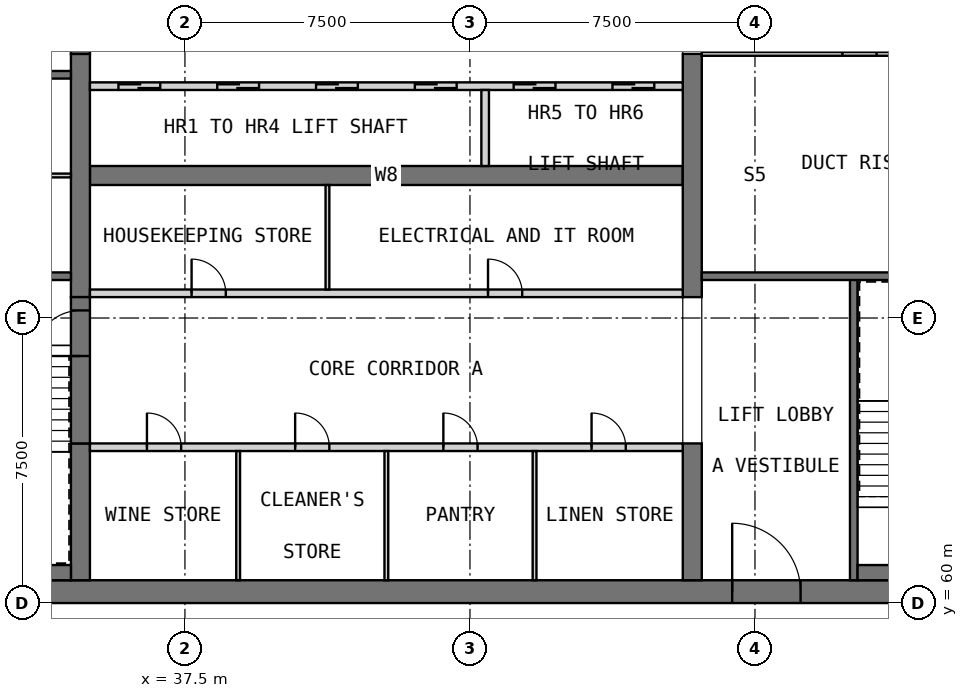
"""IFC4 building model, lengths in metres.
Left out: names, types, materials, properties, quantities, classifications, styles, units other than length and angle.
Written with IfcOpenShell. Run it as: python <this file> out.ifc"""

import sys

from ifc_helpers import new_model, si_unit, direction, frame, frame_2d, origin, place, context, subcontext, project, spatial, rectangle, extrude, element, fill, save


model = new_model("IFC4")
c1 = context("Model", 3, precision=1e-05, world=origin(), true_north=direction((0.0, 1.0)))
c2 = subcontext(c1, "Body", "Model", "MODEL_VIEW")
j1 = project(units=[si_unit("LENGTHUNIT", "METRE"), si_unit("PLANEANGLEUNIT", "RADIAN")], contexts=[c1])
p1 = place(None, origin())
s1 = spatial("IfcSite", under=j1, at=p1, CompositionType="ELEMENT")
p2 = place(p1, origin())
s2 = spatial("IfcBuilding", under=s1, at=p2, CompositionType="ELEMENT")
p3 = place(p2, frame((0.0, 0.0, 276.7)))
s3 = spatial("IfcBuildingStorey", under=s2, at=p3, CompositionType="ELEMENT", Elevation=276.7)
p4 = place(p3, frame((30.0, 60.3, 0.0), z_axis=(0.0, 0.0, 1.0), x_axis=(1.0, 0.0, 0.0)))
e1 = element("IfcWall", 1, at=p4, inside=s3, PredefinedType="SHEAR", context=c2, shape_type="SweptSolid", body=[
    extrude(rectangle(XDim=30.0, YDim=0.6, at=frame_2d((15.0, 0.0))), origin(), (0.0, 0.0, 1.0), 3.5),
])
p5 = place(p4, frame((21.9, 0.0, 0.0)))
e2 = element("IfcOpeningElement", 2, at=p5, cuts=e1, PredefinedType="OPENING", context=c2, shape_type="SweptSolid", body=[
    extrude(rectangle(XDim=1.8, YDim=2.1, at=frame_2d((0.9, 1.05))), frame((0.0, 0.31, 0.0), z_axis=(0.0, -1.0, 0.0), x_axis=(1.0, 0.0, 0.0)), (0.0, 0.0, 1.0), 0.62),
])
p6 = place(p4, frame((26.5, 0.0, 0.0)))
e3 = element("IfcOpeningElement", 3, at=p6, cuts=e1, PredefinedType="OPENING", context=c2, shape_type="SweptSolid", body=[
    extrude(rectangle(XDim=1.2, YDim=2.1, at=frame_2d((0.6, 1.05))), frame((0.0, 0.31, 0.0), z_axis=(0.0, -1.0, 0.0), x_axis=(1.0, 0.0, 0.0)), (0.0, 0.0, 1.0), 0.62),
])
p7 = place(p3, frame((35.0, 71.25, 0.0), z_axis=(0.0, 0.0, 1.0), x_axis=(1.0, 0.0, 0.0)))
e4 = element("IfcWall", 4, at=p7, inside=s3, PredefinedType="SHEAR", context=c2, shape_type="SweptSolid", body=[
    extrude(rectangle(XDim=15.6, YDim=0.5, at=frame_2d((7.8, 0.0))), origin(), (0.0, 0.0, 1.0), 3.5),
])
p8 = place(p3, frame((34.75, 60.6, 0.0), z_axis=(0.0, 0.0, 1.0), x_axis=(0.0, 1.0, 0.0)))
e5 = element("IfcWall", 5, at=p8, inside=s3, PredefinedType="SHEAR", context=c2, shape_type="SweptSolid", body=[
    extrude(rectangle(XDim=3.6, YDim=0.5, at=frame_2d((1.8, 0.0))), origin(), (0.0, 0.0, 1.0), 3.5),
])
p9 = place(p3, frame((34.75, 68.05, 0.0), z_axis=(0.0, 0.0, 1.0), x_axis=(0.0, 1.0, 0.0)))
e6 = element("IfcWall", 6, at=p9, inside=s3, PredefinedType="SHEAR", context=c2, shape_type="SweptSolid", body=[
    extrude(rectangle(XDim=6.4, YDim=0.5, at=frame_2d((3.2, 0.0))), origin(), (0.0, 0.0, 1.0), 3.5),
])
p10 = place(p3, frame((50.85, 60.6, 0.0), z_axis=(0.0, 0.0, 1.0), x_axis=(0.0, 1.0, 0.0)))
e7 = element("IfcWall", 7, at=p10, inside=s3, PredefinedType="SHEAR", context=c2, shape_type="SweptSolid", body=[
    extrude(rectangle(XDim=3.6, YDim=0.5, at=frame_2d((1.8, 0.0))), origin(), (0.0, 0.0, 1.0), 3.5),
])
p11 = place(p3, frame((50.85, 68.05, 0.0), z_axis=(0.0, 0.0, 1.0), x_axis=(0.0, 1.0, 0.0)))
e8 = element("IfcWall", 8, at=p11, inside=s3, PredefinedType="SHEAR", context=c2, shape_type="SweptSolid", body=[
    extrude(rectangle(XDim=6.4, YDim=0.5, at=frame_2d((3.2, 0.0))), origin(), (0.0, 0.0, 1.0), 3.5),
])
p12 = place(p3, frame((35.0, 64.1, 0.0), z_axis=(0.0, 0.0, 1.0), x_axis=(1.0, 0.0, 0.0)))
e9 = element("IfcWall", 9, at=p12, inside=s3, PredefinedType="PARTITIONING", context=c2, shape_type="SweptSolid", body=[
    extrude(rectangle(XDim=15.6, YDim=0.2, at=frame_2d((7.8, 0.0))), origin(), (0.0, 0.0, 1.0), 3.25),
])
p13 = place(p12, frame((1.5, 0.0, 0.0)))
e10 = element("IfcOpeningElement", 10, at=p13, cuts=e9, PredefinedType="OPENING", context=c2, shape_type="SweptSolid", body=[
    extrude(rectangle(XDim=0.9, YDim=2.1, at=frame_2d((0.45, 1.05))), frame((0.0, 0.11, 0.0), z_axis=(0.0, -1.0, 0.0), x_axis=(1.0, 0.0, 0.0)), (0.0, 0.0, 1.0), 0.22),
])
p14 = place(p12, frame((5.4, 0.0, 0.0)))
e11 = element("IfcOpeningElement", 11, at=p14, cuts=e9, PredefinedType="OPENING", context=c2, shape_type="SweptSolid", body=[
    extrude(rectangle(XDim=0.9, YDim=2.1, at=frame_2d((0.45, 1.05))), frame((0.0, 0.11, 0.0), z_axis=(0.0, -1.0, 0.0), x_axis=(1.0, 0.0, 0.0)), (0.0, 0.0, 1.0), 0.22),
])
p15 = place(p12, frame((9.3, 0.0, 0.0)))
e12 = element("IfcOpeningElement", 12, at=p15, cuts=e9, PredefinedType="OPENING", context=c2, shape_type="SweptSolid", body=[
    extrude(rectangle(XDim=0.9, YDim=2.1, at=frame_2d((0.45, 1.05))), frame((0.0, 0.11, 0.0), z_axis=(0.0, -1.0, 0.0), x_axis=(1.0, 0.0, 0.0)), (0.0, 0.0, 1.0), 0.22),
])
p16 = place(p12, frame((13.2, 0.0, 0.0)))
e13 = element("IfcOpeningElement", 13, at=p16, cuts=e9, PredefinedType="OPENING", context=c2, shape_type="SweptSolid", body=[
    extrude(rectangle(XDim=0.9, YDim=2.1, at=frame_2d((0.45, 1.05))), frame((0.0, 0.11, 0.0), z_axis=(0.0, -1.0, 0.0), x_axis=(1.0, 0.0, 0.0)), (0.0, 0.0, 1.0), 0.22),
])
for number, where, z_axis, x_axis in (
    (14, (38.9, 60.6, 0.0), (0.0, 0.0, 1.0), (0.0, 1.0, 0.0)),
    (15, (42.8, 60.6, 0.0), (0.0, 0.0, 1.0), (0.0, 1.0, 0.0)),
    (16, (46.7, 60.6, 0.0), (0.0, 0.0, 1.0), (0.0, 1.0, 0.0)),
):
    element("IfcWall", number, at=place(p3, frame(where, z_axis=z_axis, x_axis=x_axis)), inside=s3, PredefinedType="PARTITIONING", context=c2, shape_type="SweptSolid", body=[
        extrude(rectangle(XDim=3.4, YDim=0.1, at=frame_2d((1.7, 0.0))), origin(), (0.0, 0.0, 1.0), 3.25),
    ])
p17 = place(p3, frame((35.0, 68.15, 0.0), z_axis=(0.0, 0.0, 1.0), x_axis=(1.0, 0.0, 0.0)))
e17 = element("IfcWall", 17, at=p17, inside=s3, PredefinedType="PARTITIONING", context=c2, shape_type="SweptSolid", body=[
    extrude(rectangle(XDim=15.6, YDim=0.2, at=frame_2d((7.8, 0.0))), origin(), (0.0, 0.0, 1.0), 3.25),
])
p18 = place(p17, frame((2.675, 0.0, 0.0)))
e18 = element("IfcOpeningElement", 18, at=p18, cuts=e17, PredefinedType="OPENING", context=c2, shape_type="SweptSolid", body=[
    extrude(rectangle(XDim=0.9, YDim=2.1, at=frame_2d((0.45, 1.05))), frame((0.0, 0.11, 0.0), z_axis=(0.0, -1.0, 0.0), x_axis=(1.0, 0.0, 0.0)), (0.0, 0.0, 1.0), 0.22),
])
p19 = place(p17, frame((10.475, 0.0, 0.0)))
e19 = element("IfcOpeningElement", 19, at=p19, cuts=e17, PredefinedType="OPENING", context=c2, shape_type="SweptSolid", body=[
    extrude(rectangle(XDim=0.9, YDim=2.1, at=frame_2d((0.45, 1.05))), frame((0.0, 0.11, 0.0), z_axis=(0.0, -1.0, 0.0), x_axis=(1.0, 0.0, 0.0)), (0.0, 0.0, 1.0), 0.22),
])
p20 = place(p3, frame((41.25, 68.25, 0.0), z_axis=(0.0, 0.0, 1.0), x_axis=(0.0, 1.0, 0.0)))
e20 = element("IfcWall", 20, at=p20, inside=s3, PredefinedType="PARTITIONING", context=c2, shape_type="SweptSolid", body=[
    extrude(rectangle(XDim=2.75, YDim=0.1, at=frame_2d((1.375, 0.0))), origin(), (0.0, 0.0, 1.0), 3.25),
])
p21 = place(p3, frame((35.0, 73.6, 0.0), z_axis=(0.0, 0.0, 1.0), x_axis=(1.0, 0.0, 0.0)))
e21 = element("IfcWall", 21, at=p21, inside=s3, PredefinedType="SOLIDWALL", context=c2, shape_type="SweptSolid", body=[
    extrude(rectangle(XDim=15.6, YDim=0.2, at=frame_2d((7.8, 0.0))), origin(), (0.0, 0.0, 1.0), 3.5),
])
p22 = place(p21, frame((0.75, 0.0, 0.0)))
e22 = element("IfcOpeningElement", 22, at=p22, cuts=e21, PredefinedType="OPENING", context=c2, shape_type="SweptSolid", body=[
    extrude(rectangle(XDim=1.1, YDim=2.1, at=frame_2d((0.55, 1.05))), frame((0.0, 0.11, 0.0), z_axis=(0.0, -1.0, 0.0), x_axis=(1.0, 0.0, 0.0)), (0.0, 0.0, 1.0), 0.22),
])
p23 = place(p21, frame((3.35, 0.0, 0.0)))
e23 = element("IfcOpeningElement", 23, at=p23, cuts=e21, PredefinedType="OPENING", context=c2, shape_type="SweptSolid", body=[
    extrude(rectangle(XDim=1.1, YDim=2.1, at=frame_2d((0.55, 1.05))), frame((0.0, 0.11, 0.0), z_axis=(0.0, -1.0, 0.0), x_axis=(1.0, 0.0, 0.0)), (0.0, 0.0, 1.0), 0.22),
])
p24 = place(p21, frame((5.95, 0.0, 0.0)))
e24 = element("IfcOpeningElement", 24, at=p24, cuts=e21, PredefinedType="OPENING", context=c2, shape_type="SweptSolid", body=[
    extrude(rectangle(XDim=1.1, YDim=2.1, at=frame_2d((0.55, 1.05))), frame((0.0, 0.11, 0.0), z_axis=(0.0, -1.0, 0.0), x_axis=(1.0, 0.0, 0.0)), (0.0, 0.0, 1.0), 0.22),
])
p25 = place(p21, frame((8.55, 0.0, 0.0)))
e25 = element("IfcOpeningElement", 25, at=p25, cuts=e21, PredefinedType="OPENING", context=c2, shape_type="SweptSolid", body=[
    extrude(rectangle(XDim=1.1, YDim=2.1, at=frame_2d((0.55, 1.05))), frame((0.0, 0.11, 0.0), z_axis=(0.0, -1.0, 0.0), x_axis=(1.0, 0.0, 0.0)), (0.0, 0.0, 1.0), 0.22),
])
p26 = place(p21, frame((11.15, 0.0, 0.0)))
e26 = element("IfcOpeningElement", 26, at=p26, cuts=e21, PredefinedType="OPENING", context=c2, shape_type="SweptSolid", body=[
    extrude(rectangle(XDim=1.1, YDim=2.1, at=frame_2d((0.55, 1.05))), frame((0.0, 0.11, 0.0), z_axis=(0.0, -1.0, 0.0), x_axis=(1.0, 0.0, 0.0)), (0.0, 0.0, 1.0), 0.22),
])
p27 = place(p21, frame((13.75, 0.0, 0.0)))
e27 = element("IfcOpeningElement", 27, at=p27, cuts=e21, PredefinedType="OPENING", context=c2, shape_type="SweptSolid", body=[
    extrude(rectangle(XDim=1.1, YDim=2.1, at=frame_2d((0.55, 1.05))), frame((0.0, 0.11, 0.0), z_axis=(0.0, -1.0, 0.0), x_axis=(1.0, 0.0, 0.0)), (0.0, 0.0, 1.0), 0.22),
])
p28 = place(p3, frame((45.4, 71.5, 0.0), z_axis=(0.0, 0.0, 1.0), x_axis=(0.0, 1.0, 0.0)))
e28 = element("IfcWall", 28, at=p28, inside=s3, PredefinedType="SOLIDWALL", context=c2, shape_type="SweptSolid", body=[
    extrude(rectangle(XDim=2.0, YDim=0.2, at=frame_2d((1.0, 0.0))), origin(), (0.0, 0.0, 1.0), 3.5),
])
p29 = place(p3, frame((34.75, 64.2, 0.0), z_axis=(0.0, 0.0, 1.0), x_axis=(0.0, 1.0, 0.0)))
e29 = element("IfcWall", 29, at=p29, inside=s3, PredefinedType="SOLIDWALL", context=c2, shape_type="SweptSolid", body=[
    extrude(rectangle(XDim=3.85, YDim=0.5, at=frame_2d((1.925, 0.0))), origin(), (0.0, 0.0, 1.0), 2.3),
])
p30 = place(p29, frame((2.3, 0.0, 0.0)))
e30 = element("IfcOpeningElement", 30, at=p30, cuts=e29, PredefinedType="OPENING", context=c2, shape_type="SweptSolid", body=[
    extrude(rectangle(XDim=1.2, YDim=2.1, at=frame_2d((0.6, 1.05))), frame((0.0, 0.26, 0.0), z_axis=(0.0, -1.0, 0.0), x_axis=(1.0, 0.0, 0.0)), (0.0, 0.0, 1.0), 0.52),
])
p31 = place(p3, frame((34.75, 74.45, 0.0), z_axis=(0.0, 0.0, 1.0), x_axis=(0.0, 1.0, 0.0)))
e31 = element("IfcWall", 31, at=p31, inside=s3, PredefinedType="SOLIDWALL", context=c2, shape_type="SweptSolid", body=[
    extrude(rectangle(XDim=3.85, YDim=0.5, at=frame_2d((1.925, 0.0))), origin(), (0.0, 0.0, 1.0), 2.3),
])
p32 = place(p31, frame((1.0, 0.0, 0.0)))
e32 = element("IfcOpeningElement", 32, at=p32, cuts=e31, PredefinedType="OPENING", context=c2, shape_type="SweptSolid", body=[
    extrude(rectangle(XDim=1.2, YDim=2.1, at=frame_2d((0.6, 1.05))), frame((0.0, 0.26, 0.0), z_axis=(0.0, -1.0, 0.0), x_axis=(1.0, 0.0, 0.0)), (0.0, 0.0, 1.0), 0.52),
])
p33 = place(p3, frame((30.6, 68.6, 0.0), z_axis=(0.0, 0.0, 1.0), x_axis=(1.0, 0.0, 0.0)))
e33 = element("IfcWall", 33, at=p33, inside=s3, PredefinedType="SOLIDWALL", context=c2, shape_type="SweptSolid", body=[
    extrude(rectangle(XDim=3.9, YDim=0.2, at=frame_2d((1.95, 0.0))), origin(), (0.0, 0.0, 1.0), 3.25),
])
p34 = place(p33, frame((1.7, 0.0, 0.0)))
e34 = element("IfcOpeningElement", 34, at=p34, cuts=e33, PredefinedType="OPENING", context=c2, shape_type="SweptSolid", body=[
    extrude(rectangle(XDim=0.9, YDim=2.1, at=frame_2d((0.45, 1.05))), frame((0.0, 0.11, 0.0), z_axis=(0.0, -1.0, 0.0), x_axis=(1.0, 0.0, 0.0)), (0.0, 0.0, 1.0), 0.22),
])
p35 = place(p3, frame((30.6, 73.9, 0.0), z_axis=(0.0, 0.0, 1.0), x_axis=(1.0, 0.0, 0.0)))
e35 = element("IfcWall", 35, at=p35, inside=s3, PredefinedType="SOLIDWALL", context=c2, shape_type="SweptSolid", body=[
    extrude(rectangle(XDim=3.9, YDim=0.2, at=frame_2d((1.95, 0.0))), origin(), (0.0, 0.0, 1.0), 3.25),
])
p36 = place(p35, frame((1.7, 0.0, 0.0)))
e36 = element("IfcOpeningElement", 36, at=p36, cuts=e35, PredefinedType="OPENING", context=c2, shape_type="SweptSolid", body=[
    extrude(rectangle(XDim=0.9, YDim=2.1, at=frame_2d((0.45, 1.05))), frame((0.0, 0.11, 0.0), z_axis=(0.0, -1.0, 0.0), x_axis=(1.0, 0.0, 0.0)), (0.0, 0.0, 1.0), 0.22),
])
p37 = place(p3, frame((55.1, 60.6, 0.0), z_axis=(0.0, 0.0, 1.0), x_axis=(0.0, 1.0, 0.0)))
e37 = element("IfcWall", 37, at=p37, inside=s3, PredefinedType="SOLIDWALL", context=c2, shape_type="SweptSolid", body=[
    extrude(rectangle(XDim=8.0, YDim=0.2, at=frame_2d((4.0, 0.0))), origin(), (0.0, 0.0, 1.0), 3.25),
])
p38 = place(p3, frame((51.1, 68.6, 0.0), z_axis=(0.0, 0.0, 1.0), x_axis=(1.0, 0.0, 0.0)))
e38 = element("IfcWall", 38, at=p38, inside=s3, PredefinedType="SOLIDWALL", context=c2, shape_type="SweptSolid", body=[
    extrude(rectangle(XDim=8.3, YDim=0.2, at=frame_2d((4.15, 0.0))), origin(), (0.0, 0.0, 1.0), 3.25),
])
p39 = place(p3, frame((31.0, 60.8, 0.0), z_axis=(0.0, 0.0, 1.0), x_axis=(1.0, 0.0, 0.0)))
e39 = element("IfcWall", 39, at=p39, inside=s3, PredefinedType="SOLIDWALL", context=c2, shape_type="SweptSolid", body=[
    extrude(rectangle(XDim=3.5, YDim=0.4, at=frame_2d((1.75, 0.0))), origin(), (0.0, 0.0, 1.0), 3.25),
])
p40 = place(p3, frame((55.2, 60.8, 0.0), z_axis=(0.0, 0.0, 1.0), x_axis=(1.0, 0.0, 0.0)))
e40 = element("IfcWall", 40, at=p40, inside=s3, PredefinedType="SOLIDWALL", context=c2, shape_type="SweptSolid", body=[
    extrude(rectangle(XDim=1.3, YDim=0.4, at=frame_2d((0.65, 0.0))), origin(), (0.0, 0.0, 1.0), 3.25),
])
p41 = place(p3, frame((30.6, 71.25, 0.0), z_axis=(0.0, 0.0, 1.0), x_axis=(1.0, 0.0, 0.0)))
e41 = element("IfcWall", 41, at=p41, inside=s3, PredefinedType="PARTITIONING", context=c2, shape_type="SweptSolid", body=[
    extrude(rectangle(XDim=3.9, YDim=0.1, at=frame_2d((1.95, 0.0))), origin(), (0.0, 0.0, 1.0), 3.25),
])
p42 = place(p3, frame((51.1, 74.45, 0.0), z_axis=(0.0, 0.0, 1.0), x_axis=(1.0, 0.0, 0.0)))
e42 = element("IfcWall", 42, at=p42, inside=s3, PredefinedType="PARTITIONING", context=c2, shape_type="SweptSolid", body=[
    extrude(rectangle(XDim=8.3, YDim=0.1, at=frame_2d((4.15, 0.0))), origin(), (0.0, 0.0, 1.0), 3.25),
])
p43 = place(p42, frame((3.7, 0.0, 0.0)))
e43 = element("IfcOpeningElement", 43, at=p43, cuts=e42, PredefinedType="OPENING", context=c2, shape_type="SweptSolid", body=[
    extrude(rectangle(XDim=0.9, YDim=2.1, at=frame_2d((0.45, 1.05))), frame((0.0, 0.06, 0.0), z_axis=(0.0, -1.0, 0.0), x_axis=(1.0, 0.0, 0.0)), (0.0, 0.0, 1.0), 0.12),
])
p44 = place(p13, origin())
e44 = element("IfcDoor", 44, at=p44, inside=s3, OperationType="SINGLE_SWING_LEFT", PredefinedType="DOOR", context=c2, shape_type="SweptSolid", body=[
    extrude(rectangle(XDim=0.9, YDim=2.1, at=frame_2d((0.45, 1.05))), frame((0.0, 0.025, 0.0), z_axis=(0.0, -1.0, 0.0), x_axis=(1.0, 0.0, 0.0)), (0.0, 0.0, 1.0), 0.05),
])
fill(e10, e44)
p45 = place(p14, origin())
e45 = element("IfcDoor", 45, at=p45, inside=s3, OperationType="SINGLE_SWING_RIGHT", PredefinedType="DOOR", context=c2, shape_type="SweptSolid", body=[
    extrude(rectangle(XDim=0.9, YDim=2.1, at=frame_2d((0.45, 1.05))), frame((0.0, 0.025, 0.0), z_axis=(0.0, -1.0, 0.0), x_axis=(1.0, 0.0, 0.0)), (0.0, 0.0, 1.0), 0.05),
])
fill(e11, e45)
p46 = place(p15, origin())
e46 = element("IfcDoor", 46, at=p46, inside=s3, OperationType="SINGLE_SWING_LEFT", PredefinedType="DOOR", context=c2, shape_type="SweptSolid", body=[
    extrude(rectangle(XDim=0.9, YDim=2.1, at=frame_2d((0.45, 1.05))), frame((0.0, 0.025, 0.0), z_axis=(0.0, -1.0, 0.0), x_axis=(1.0, 0.0, 0.0)), (0.0, 0.0, 1.0), 0.05),
])
fill(e12, e46)
p47 = place(p16, origin())
e47 = element("IfcDoor", 47, at=p47, inside=s3, OperationType="SINGLE_SWING_RIGHT", PredefinedType="DOOR", context=c2, shape_type="SweptSolid", body=[
    extrude(rectangle(XDim=0.9, YDim=2.1, at=frame_2d((0.45, 1.05))), frame((0.0, 0.025, 0.0), z_axis=(0.0, -1.0, 0.0), x_axis=(1.0, 0.0, 0.0)), (0.0, 0.0, 1.0), 0.05),
])
fill(e13, e47)
p48 = place(p18, origin())
e48 = element("IfcDoor", 48, at=p48, inside=s3, OperationType="SINGLE_SWING_LEFT", PredefinedType="DOOR", context=c2, shape_type="SweptSolid", body=[
    extrude(rectangle(XDim=0.9, YDim=2.1, at=frame_2d((0.45, 1.05))), frame((0.0, 0.025, 0.0), z_axis=(0.0, -1.0, 0.0), x_axis=(1.0, 0.0, 0.0)), (0.0, 0.0, 1.0), 0.05),
])
fill(e18, e48)
p49 = place(p19, origin())
e49 = element("IfcDoor", 49, at=p49, inside=s3, OperationType="SINGLE_SWING_RIGHT", PredefinedType="DOOR", context=c2, shape_type="SweptSolid", body=[
    extrude(rectangle(XDim=0.9, YDim=2.1, at=frame_2d((0.45, 1.05))), frame((0.0, 0.025, 0.0), z_axis=(0.0, -1.0, 0.0), x_axis=(1.0, 0.0, 0.0)), (0.0, 0.0, 1.0), 0.05),
])
fill(e19, e49)
p50 = place(p22, origin())
e50 = element("IfcDoor", 50, at=p50, inside=s3, OperationType="DOUBLE_DOOR_SLIDING", PredefinedType="DOOR", context=c2, shape_type="SweptSolid", body=[
    extrude(rectangle(XDim=1.1, YDim=2.1, at=frame_2d((0.55, 1.05))), frame((0.0, 0.025, 0.0), z_axis=(0.0, -1.0, 0.0), x_axis=(1.0, 0.0, 0.0)), (0.0, 0.0, 1.0), 0.05),
])
fill(e22, e50)
p51 = place(p23, origin())
e51 = element("IfcDoor", 51, at=p51, inside=s3, OperationType="DOUBLE_DOOR_SLIDING", PredefinedType="DOOR", context=c2, shape_type="SweptSolid", body=[
    extrude(rectangle(XDim=1.1, YDim=2.1, at=frame_2d((0.55, 1.05))), frame((0.0, 0.025, 0.0), z_axis=(0.0, -1.0, 0.0), x_axis=(1.0, 0.0, 0.0)), (0.0, 0.0, 1.0), 0.05),
])
fill(e23, e51)
p52 = place(p24, origin())
e52 = element("IfcDoor", 52, at=p52, inside=s3, OperationType="DOUBLE_DOOR_SLIDING", PredefinedType="DOOR", context=c2, shape_type="SweptSolid", body=[
    extrude(rectangle(XDim=1.1, YDim=2.1, at=frame_2d((0.55, 1.05))), frame((0.0, 0.025, 0.0), z_axis=(0.0, -1.0, 0.0), x_axis=(1.0, 0.0, 0.0)), (0.0, 0.0, 1.0), 0.05),
])
fill(e24, e52)
p53 = place(p25, origin())
e53 = element("IfcDoor", 53, at=p53, inside=s3, OperationType="DOUBLE_DOOR_SLIDING", PredefinedType="DOOR", context=c2, shape_type="SweptSolid", body=[
    extrude(rectangle(XDim=1.1, YDim=2.1, at=frame_2d((0.55, 1.05))), frame((0.0, 0.025, 0.0), z_axis=(0.0, -1.0, 0.0), x_axis=(1.0, 0.0, 0.0)), (0.0, 0.0, 1.0), 0.05),
])
fill(e25, e53)
p54 = place(p26, origin())
e54 = element("IfcDoor", 54, at=p54, inside=s3, OperationType="DOUBLE_DOOR_SLIDING", PredefinedType="DOOR", context=c2, shape_type="SweptSolid", body=[
    extrude(rectangle(XDim=1.1, YDim=2.1, at=frame_2d((0.55, 1.05))), frame((0.0, 0.025, 0.0), z_axis=(0.0, -1.0, 0.0), x_axis=(1.0, 0.0, 0.0)), (0.0, 0.0, 1.0), 0.05),
])
fill(e26, e54)
p55 = place(p27, origin())
e55 = element("IfcDoor", 55, at=p55, inside=s3, OperationType="DOUBLE_DOOR_SLIDING", PredefinedType="DOOR", context=c2, shape_type="SweptSolid", body=[
    extrude(rectangle(XDim=1.1, YDim=2.1, at=frame_2d((0.55, 1.05))), frame((0.0, 0.025, 0.0), z_axis=(0.0, -1.0, 0.0), x_axis=(1.0, 0.0, 0.0)), (0.0, 0.0, 1.0), 0.05),
])
fill(e27, e55)
p56 = place(p5, origin())
e56 = element("IfcDoor", 56, at=p56, inside=s3, OperationType="DOUBLE_DOOR_SINGLE_SWING", PredefinedType="DOOR", context=c2, shape_type="SweptSolid", body=[
    extrude(rectangle(XDim=1.8, YDim=2.1, at=frame_2d((0.9, 1.05))), frame((0.0, 0.025, 0.0), z_axis=(0.0, -1.0, 0.0), x_axis=(1.0, 0.0, 0.0)), (0.0, 0.0, 1.0), 0.05),
])
fill(e2, e56)
p57 = place(p30, origin())
e57 = element("IfcDoor", 57, at=p57, inside=s3, OperationType="SINGLE_SWING_LEFT", PredefinedType="DOOR", context=c2, shape_type="SweptSolid", body=[
    extrude(rectangle(XDim=1.2, YDim=2.1, at=frame_2d((0.6, 1.05))), frame((0.0, 0.025, 0.0), z_axis=(0.0, -1.0, 0.0), x_axis=(1.0, 0.0, 0.0)), (0.0, 0.0, 1.0), 0.05),
])
fill(e30, e57)
p58 = place(p43, origin())
e58 = element("IfcDoor", 58, at=p58, inside=s3, OperationType="SINGLE_SWING_LEFT", PredefinedType="DOOR", context=c2, shape_type="SweptSolid", body=[
    extrude(rectangle(XDim=0.9, YDim=2.1, at=frame_2d((0.45, 1.05))), frame((0.0, 0.025, 0.0), z_axis=(0.0, -1.0, 0.0), x_axis=(1.0, 0.0, 0.0)), (0.0, 0.0, 1.0), 0.05),
])
fill(e43, e58)
save(model, sys.argv[1])
